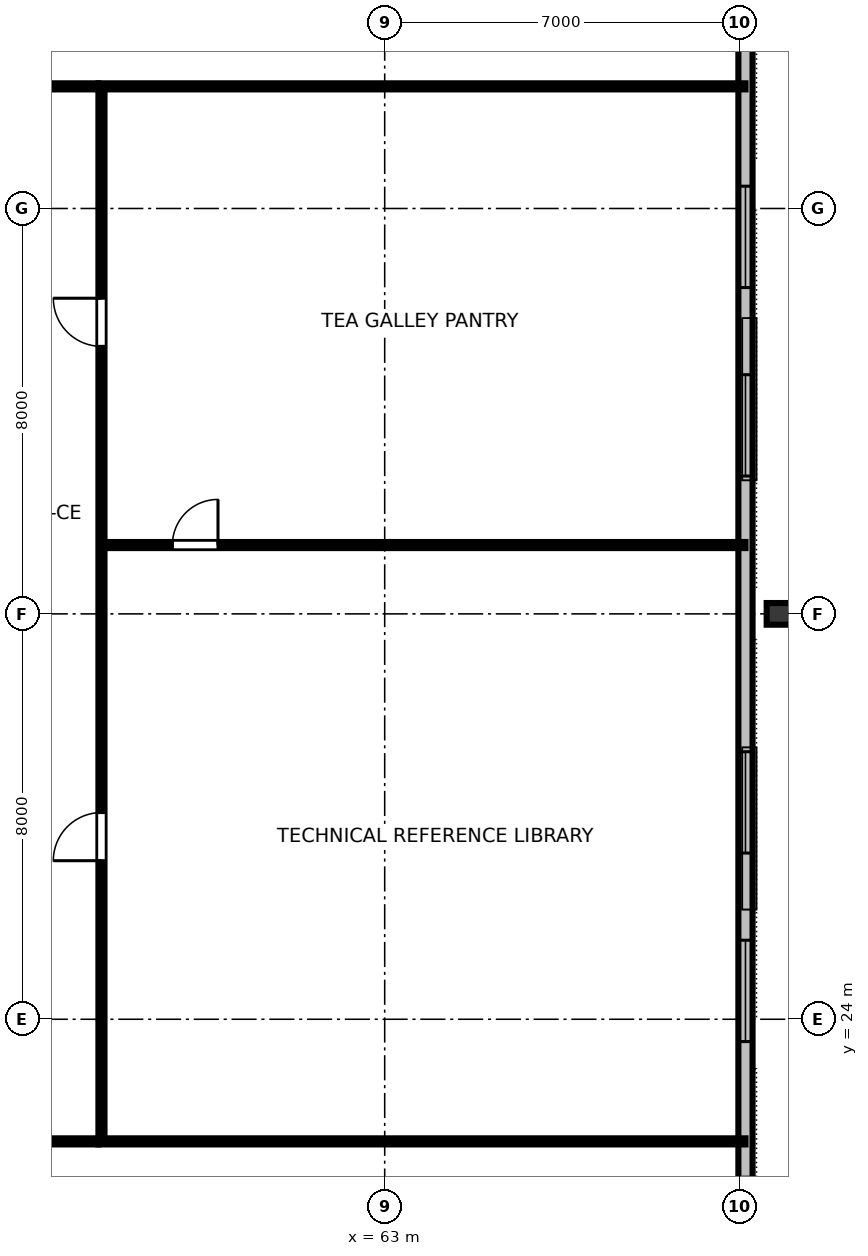
"""IFC4 building model, lengths in metres.
Left out: names, types, materials, properties, quantities, classifications, styles, units other than length and angle.
Written with IfcOpenShell. Run it as: python <this file> out.ifc"""

import sys

from ifc_helpers import new_model, si_unit, direction, frame, frame_2d, origin, origin_2d, place, context, subcontext, project, spatial, rectangle, i_section, extrude, element, fill, save


model = new_model("IFC4")
c1 = context("Model", 3, precision=1e-05, world=origin(), true_north=direction((0.0, 1.0)))
c2 = subcontext(c1, "Body", "Model", "MODEL_VIEW")
j1 = project(units=[si_unit("LENGTHUNIT", "METRE"), si_unit("PLANEANGLEUNIT", "RADIAN")], contexts=[c1])
p1 = place(None, origin())
s1 = spatial("IfcSite", under=j1, at=p1, CompositionType="ELEMENT")
p2 = place(p1, origin())
s2 = spatial("IfcBuilding", under=s1, at=p2, CompositionType="ELEMENT")
p3 = place(p2, frame((0.0, 0.0, 56.8)))
s3 = spatial("IfcBuildingStorey", under=s2, at=p3, CompositionType="ELEMENT", Elevation=56.8)
p4 = place(p3, frame((70.78, 32.0, 0.0), z_axis=(0.103626949617, 0.0, 0.994616235195), x_axis=(-0.994616235195, 0.0, 0.103626949617)))
e1 = element("IfcColumn", 1, at=p4, inside=s3, PredefinedType="COLUMN", context=c2, shape_type="SweptSolid", body=[
    extrude(i_section(OverallWidth=0.428, OverallDepth=0.483, WebThickness=0.051, FlangeThickness=0.082, FilletRadius=0.025, at=origin_2d()), origin(), (0.0, 0.0, 1.0), 3.376),
])
p5 = place(p3, frame((70.12, 14.16, 0.0), z_axis=(0.0, 0.0, 1.0), x_axis=(0.0, 1.0, 0.0)))
e2 = element("IfcWall", 2, at=p5, inside=s3, PredefinedType="STANDARD", context=c2, shape_type="SweptSolid", body=[
    extrude(rectangle(XDim=35.68, YDim=0.28, at=frame_2d((17.84, 0.0))), origin(), (0.0, 0.0, 1.0), 3.36),
])
p6 = place(p5, frame((1.96, 0.0, 0.8)))
e3 = element("IfcOpeningElement", 3, at=p6, cuts=e2, PredefinedType="OPENING", context=c2, shape_type="SweptSolid", body=[
    extrude(rectangle(XDim=2.0, YDim=1.95, at=frame_2d((1.0, 0.975))), frame((0.0, 0.15, 0.0), z_axis=(0.0, -1.0, 0.0), x_axis=(1.0, 0.0, 0.0)), (0.0, 0.0, 1.0), 0.3),
])
p7 = place(p5, frame((9.4, 0.0, 0.8)))
e4 = element("IfcOpeningElement", 4, at=p7, cuts=e2, PredefinedType="OPENING", context=c2, shape_type="SweptSolid", body=[
    extrude(rectangle(XDim=2.0, YDim=1.95, at=frame_2d((1.0, 0.975))), frame((0.0, 0.15, 0.0), z_axis=(0.0, -1.0, 0.0), x_axis=(1.0, 0.0, 0.0)), (0.0, 0.0, 1.0), 0.3),
])
p8 = place(p5, frame((13.12, 0.0, 0.8)))
e5 = element("IfcOpeningElement", 5, at=p8, cuts=e2, PredefinedType="OPENING", context=c2, shape_type="SweptSolid", body=[
    extrude(rectangle(XDim=2.0, YDim=1.95, at=frame_2d((1.0, 0.975))), frame((0.0, 0.15, 0.0), z_axis=(0.0, -1.0, 0.0), x_axis=(1.0, 0.0, 0.0)), (0.0, 0.0, 1.0), 0.3),
])
p9 = place(p5, frame((20.56, 0.0, 0.8)))
e6 = element("IfcOpeningElement", 6, at=p9, cuts=e2, PredefinedType="OPENING", context=c2, shape_type="SweptSolid", body=[
    extrude(rectangle(XDim=2.0, YDim=1.95, at=frame_2d((1.0, 0.975))), frame((0.0, 0.15, 0.0), z_axis=(0.0, -1.0, 0.0), x_axis=(1.0, 0.0, 0.0)), (0.0, 0.0, 1.0), 0.3),
])
p10 = place(p5, frame((24.28, 0.0, 0.8)))
e7 = element("IfcOpeningElement", 7, at=p10, cuts=e2, PredefinedType="OPENING", context=c2, shape_type="SweptSolid", body=[
    extrude(rectangle(XDim=2.0, YDim=1.95, at=frame_2d((1.0, 0.975))), frame((0.0, 0.15, 0.0), z_axis=(0.0, -1.0, 0.0), x_axis=(1.0, 0.0, 0.0)), (0.0, 0.0, 1.0), 0.3),
])
p11 = place(p5, frame((31.72, 0.0, 0.8)))
e8 = element("IfcOpeningElement", 8, at=p11, cuts=e2, PredefinedType="OPENING", context=c2, shape_type="SweptSolid", body=[
    extrude(rectangle(XDim=2.0, YDim=1.95, at=frame_2d((1.0, 0.975))), frame((0.0, 0.15, 0.0), z_axis=(0.0, -1.0, 0.0), x_axis=(1.0, 0.0, 0.0)), (0.0, 0.0, 1.0), 0.3),
])
p12 = place(p3, frame((34.65, 21.59, 0.0), z_axis=(0.0, 0.0, 1.0), x_axis=(1.0, 0.0, 0.0)))
e9 = element("IfcWall", 9, at=p12, inside=s3, PredefinedType="PARTITIONING", context=c2, shape_type="SweptSolid", body=[
    extrude(rectangle(XDim=22.7, YDim=0.12, at=frame_2d((11.35, 0.0))), origin(), (0.0, 0.0, 1.0), 2.64),
])
p13 = place(p12, frame((2.045, 0.0, 0.0)))
e10 = element("IfcOpeningElement", 10, at=p13, cuts=e9, PredefinedType="OPENING", context=c2, shape_type="SweptSolid", body=[
    extrude(rectangle(XDim=0.95, YDim=2.15, at=frame_2d((0.475, 1.075))), frame((0.0, 0.07, 0.0), z_axis=(0.0, -1.0, 0.0), x_axis=(1.0, 0.0, 0.0)), (0.0, 0.0, 1.0), 0.14),
])
p14 = place(p12, frame((7.126, 0.0, 0.0)))
e11 = element("IfcOpeningElement", 11, at=p14, cuts=e9, PredefinedType="OPENING", context=c2, shape_type="SweptSolid", body=[
    extrude(rectangle(XDim=0.95, YDim=2.15, at=frame_2d((0.475, 1.075))), frame((0.0, 0.07, 0.0), z_axis=(0.0, -1.0, 0.0), x_axis=(1.0, 0.0, 0.0)), (0.0, 0.0, 1.0), 0.14),
])
p15 = place(p12, frame((11.509, 0.0, 0.0)))
e12 = element("IfcOpeningElement", 12, at=p15, cuts=e9, PredefinedType="OPENING", context=c2, shape_type="SweptSolid", body=[
    extrude(rectangle(XDim=0.95, YDim=2.15, at=frame_2d((0.475, 1.075))), frame((0.0, 0.07, 0.0), z_axis=(0.0, -1.0, 0.0), x_axis=(1.0, 0.0, 0.0)), (0.0, 0.0, 1.0), 0.14),
])
p16 = place(p12, frame((17.638, 0.0, 0.0)))
e13 = element("IfcOpeningElement", 13, at=p16, cuts=e9, PredefinedType="OPENING", context=c2, shape_type="SweptSolid", body=[
    extrude(rectangle(XDim=0.95, YDim=2.15, at=frame_2d((0.475, 1.075))), frame((0.0, 0.07, 0.0), z_axis=(0.0, -1.0, 0.0), x_axis=(1.0, 0.0, 0.0)), (0.0, 0.0, 1.0), 0.14),
])
p17 = place(p3, frame((34.65, 42.41, 0.0), z_axis=(0.0, 0.0, 1.0), x_axis=(1.0, 0.0, 0.0)))
e14 = element("IfcWall", 14, at=p17, inside=s3, PredefinedType="PARTITIONING", context=c2, shape_type="SweptSolid", body=[
    extrude(rectangle(XDim=22.7, YDim=0.12, at=frame_2d((11.35, 0.0))), origin(), (0.0, 0.0, 1.0), 2.64),
])
p18 = place(p17, frame((5.745, 0.0, 0.0)))
e15 = element("IfcOpeningElement", 15, at=p18, cuts=e14, PredefinedType="OPENING", context=c2, shape_type="SweptSolid", body=[
    extrude(rectangle(XDim=0.95, YDim=2.15, at=frame_2d((0.475, 1.075))), frame((0.0, 0.07, 0.0), z_axis=(0.0, -1.0, 0.0), x_axis=(1.0, 0.0, 0.0)), (0.0, 0.0, 1.0), 0.14),
])
p19 = place(p17, frame((16.955, 0.0, 0.0)))
e16 = element("IfcOpeningElement", 16, at=p19, cuts=e14, PredefinedType="OPENING", context=c2, shape_type="SweptSolid", body=[
    extrude(rectangle(XDim=0.95, YDim=2.15, at=frame_2d((0.475, 1.075))), frame((0.0, 0.07, 0.0), z_axis=(0.0, -1.0, 0.0), x_axis=(1.0, 0.0, 0.0)), (0.0, 0.0, 1.0), 0.14),
])
p20 = place(p3, frame((57.41, 33.358, 0.0), z_axis=(0.0, 0.0, 1.0), x_axis=(1.0, 0.0, 0.0)))
e17 = element("IfcWall", 17, at=p20, inside=s3, PredefinedType="PARTITIONING", context=c2, shape_type="SweptSolid", body=[
    extrude(rectangle(XDim=12.71, YDim=0.12, at=frame_2d((6.355, 0.0))), origin(), (0.0, 0.0, 1.0), 2.64),
])
p21 = place(p20, frame((1.4, 0.0, 0.0)))
e18 = element("IfcOpeningElement", 18, at=p21, cuts=e17, PredefinedType="OPENING", context=c2, shape_type="SweptSolid", body=[
    extrude(rectangle(XDim=0.9, YDim=2.15, at=frame_2d((0.45, 1.075))), frame((0.0, 0.07, 0.0), z_axis=(0.0, -1.0, 0.0), x_axis=(1.0, 0.0, 0.0)), (0.0, 0.0, 1.0), 0.14),
])
p22 = place(p3, frame((57.41, 21.65, 0.0), z_axis=(0.0, 0.0, 1.0), x_axis=(0.0, 1.0, 0.0)))
e19 = element("IfcWall", 19, at=p22, inside=s3, PredefinedType="PARTITIONING", context=c2, shape_type="SweptSolid", body=[
    extrude(rectangle(XDim=20.7, YDim=0.12, at=frame_2d((10.35, 0.0))), origin(), (0.0, 0.0, 1.0), 2.64),
])
p23 = place(p22, frame((5.479, 0.0, 0.0)))
e20 = element("IfcOpeningElement", 20, at=p23, cuts=e19, PredefinedType="OPENING", context=c2, shape_type="SweptSolid", body=[
    extrude(rectangle(XDim=0.95, YDim=2.15, at=frame_2d((0.475, 1.075))), frame((0.0, 0.07, 0.0), z_axis=(0.0, -1.0, 0.0), x_axis=(1.0, 0.0, 0.0)), (0.0, 0.0, 1.0), 0.14),
])
p24 = place(p22, frame((15.629, 0.0, 0.0)))
e21 = element("IfcOpeningElement", 21, at=p24, cuts=e19, PredefinedType="OPENING", context=c2, shape_type="SweptSolid", body=[
    extrude(rectangle(XDim=0.95, YDim=2.15, at=frame_2d((0.475, 1.075))), frame((0.0, 0.07, 0.0), z_axis=(0.0, -1.0, 0.0), x_axis=(1.0, 0.0, 0.0)), (0.0, 0.0, 1.0), 0.14),
])
for number, where, z_axis, x_axis in (
    (22, (57.35, 21.59, 0.0), (0.0, 0.0, 1.0), (1.0, 0.0, 0.0)),
    (23, (57.35, 42.41, 0.0), (0.0, 0.0, 1.0), (1.0, 0.0, 0.0)),
):
    element("IfcWall", number, at=place(p3, frame(where, z_axis=z_axis, x_axis=x_axis)), inside=s3, PredefinedType="PARTITIONING", context=c2, shape_type="SweptSolid", body=[
        extrude(rectangle(XDim=12.77, YDim=0.12, at=frame_2d((6.385, 0.0))), origin(), (0.0, 0.0, 1.0), 2.64),
    ])
p25 = place(p7, origin())
e24 = element("IfcWindow", 24, at=p25, inside=s3, PartitioningType="SINGLE_PANEL", PredefinedType="WINDOW", context=c2, shape_type="SweptSolid", body=[
    extrude(rectangle(XDim=2.0, YDim=1.95, at=frame_2d((1.0, 0.975))), frame((0.0, 0.03, 0.0), z_axis=(0.0, -1.0, 0.0), x_axis=(1.0, 0.0, 0.0)), (0.0, 0.0, 1.0), 0.06),
])
fill(e4, e24)
p26 = place(p8, origin())
e25 = element("IfcWindow", 25, at=p26, inside=s3, PartitioningType="SINGLE_PANEL", PredefinedType="WINDOW", context=c2, shape_type="SweptSolid", body=[
    extrude(rectangle(XDim=2.0, YDim=1.95, at=frame_2d((1.0, 0.975))), frame((0.0, 0.03, 0.0), z_axis=(0.0, -1.0, 0.0), x_axis=(1.0, 0.0, 0.0)), (0.0, 0.0, 1.0), 0.06),
])
fill(e5, e25)
p27 = place(p9, origin())
e26 = element("IfcWindow", 26, at=p27, inside=s3, PartitioningType="SINGLE_PANEL", PredefinedType="WINDOW", context=c2, shape_type="SweptSolid", body=[
    extrude(rectangle(XDim=2.0, YDim=1.95, at=frame_2d((1.0, 0.975))), frame((0.0, 0.03, 0.0), z_axis=(0.0, -1.0, 0.0), x_axis=(1.0, 0.0, 0.0)), (0.0, 0.0, 1.0), 0.06),
])
fill(e6, e26)
p28 = place(p10, origin())
e27 = element("IfcWindow", 27, at=p28, inside=s3, PartitioningType="SINGLE_PANEL", PredefinedType="WINDOW", context=c2, shape_type="SweptSolid", body=[
    extrude(rectangle(XDim=2.0, YDim=1.95, at=frame_2d((1.0, 0.975))), frame((0.0, 0.03, 0.0), z_axis=(0.0, -1.0, 0.0), x_axis=(1.0, 0.0, 0.0)), (0.0, 0.0, 1.0), 0.06),
])
fill(e7, e27)
p29 = place(p21, origin())
e28 = element("IfcDoor", 28, at=p29, inside=s3, OperationType="SINGLE_SWING_RIGHT", PredefinedType="DOOR", context=c2, shape_type="SweptSolid", body=[
    extrude(rectangle(XDim=0.9, YDim=2.15, at=frame_2d((0.45, 1.075))), frame((0.0, 0.025, 0.0), z_axis=(0.0, -1.0, 0.0), x_axis=(1.0, 0.0, 0.0)), (0.0, 0.0, 1.0), 0.05),
])
fill(e18, e28)
p30 = place(p23, origin())
e29 = element("IfcDoor", 29, at=p30, inside=s3, OperationType="SINGLE_SWING_LEFT", PredefinedType="DOOR", context=c2, shape_type="SweptSolid", body=[
    extrude(rectangle(XDim=0.95, YDim=2.15, at=frame_2d((0.475, 1.075))), frame((0.0, 0.025, 0.0), z_axis=(0.0, -1.0, 0.0), x_axis=(1.0, 0.0, 0.0)), (0.0, 0.0, 1.0), 0.05),
])
fill(e20, e29)
p31 = place(p24, origin())
e30 = element("IfcDoor", 30, at=p31, inside=s3, OperationType="SINGLE_SWING_RIGHT", PredefinedType="DOOR", context=c2, shape_type="SweptSolid", body=[
    extrude(rectangle(XDim=0.95, YDim=2.15, at=frame_2d((0.475, 1.075))), frame((0.0, 0.025, 0.0), z_axis=(0.0, -1.0, 0.0), x_axis=(1.0, 0.0, 0.0)), (0.0, 0.0, 1.0), 0.05),
])
fill(e21, e30)
save(model, sys.argv[1])
